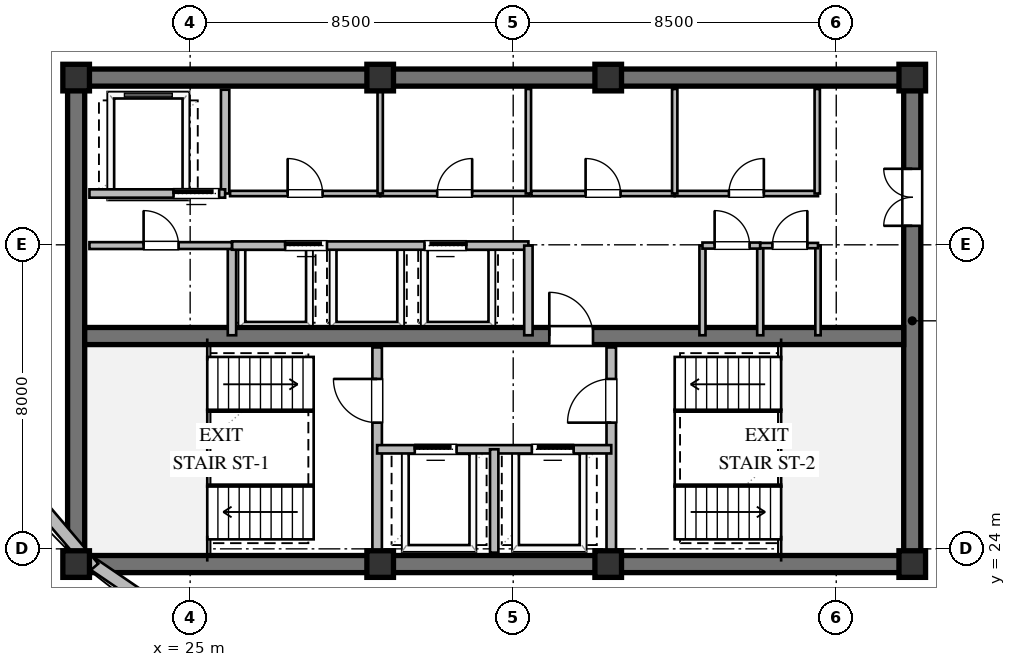
"""IFC4 building model, lengths in metres.
Left out: names, types, materials, properties, quantities, classifications, styles, units other than length and angle.
Written with IfcOpenShell. Run it as: python <this file> out.ifc"""

import sys

from ifc_helpers import new_model, si_unit, direction, frame, frame_2d, origin, origin_2d, place, context, subcontext, project, spatial, rectangle, extrude, element, fill, save


model = new_model("IFC4")
c1 = context("Model", 3, precision=1e-05, world=origin(), true_north=direction((0.0, 1.0)))
c2 = subcontext(c1, "Body", "Model", "MODEL_VIEW")
j1 = project(units=[si_unit("LENGTHUNIT", "METRE"), si_unit("PLANEANGLEUNIT", "RADIAN")], contexts=[c1])
p1 = place(None, origin())
s1 = spatial("IfcSite", under=j1, at=p1, CompositionType="ELEMENT")
p2 = place(p1, origin())
s2 = spatial("IfcBuilding", under=s1, at=p2, CompositionType="ELEMENT")
p3 = place(p2, frame((0.0, 0.0, 273.8)))
s3 = spatial("IfcBuildingStorey", under=s2, at=p3, CompositionType="ELEMENT", Elevation=273.8)
for number, where, z_axis, x_axis in (
    (1, (21.775, 23.6, 0.0), (0.0, 0.0, 1.0), (1.0, 0.0, 0.0)),
    (2, (21.775, 36.4, 0.0), (0.0, 0.0, 1.0), (1.0, 0.0, 0.0)),
):
    element("IfcWall", number, at=place(p3, frame(where, z_axis=z_axis, x_axis=x_axis)), inside=s3, PredefinedType="SHEAR", context=c2, shape_type="SweptSolid", body=[
        extrude(rectangle(XDim=22.45, YDim=0.45, at=frame_2d((11.225, 0.0))), origin(), (0.0, 0.0, 1.0), 3.56),
    ])
p4 = place(p3, frame((22.0, 23.825, 0.0), z_axis=(0.0, 0.0, 1.0), x_axis=(0.0, 1.0, 0.0)))
e3 = element("IfcWall", 3, at=p4, inside=s3, PredefinedType="SHEAR", context=c2, shape_type="SweptSolid", body=[
    extrude(rectangle(XDim=12.35, YDim=0.45, at=frame_2d((6.175, 0.0))), origin(), (0.0, 0.0, 1.0), 3.56),
])
p5 = place(p3, frame((44.0, 23.825, 0.0), z_axis=(0.0, 0.0, 1.0), x_axis=(0.0, 1.0, 0.0)))
e4 = element("IfcWall", 4, at=p5, inside=s3, PredefinedType="SHEAR", context=c2, shape_type="SweptSolid", body=[
    extrude(rectangle(XDim=12.35, YDim=0.45, at=frame_2d((6.175, 0.0))), origin(), (0.0, 0.0, 1.0), 3.56),
])
p6 = place(p5, frame((8.675, 0.0, 0.0)))
e5 = element("IfcOpeningElement", 5, at=p6, cuts=e4, PredefinedType="OPENING", context=c2, shape_type="SweptSolid", body=[
    extrude(rectangle(XDim=1.5, YDim=2.15, at=frame_2d((0.75, 1.075))), frame((0.0, 0.235, 0.0), z_axis=(0.0, -1.0, 0.0), x_axis=(1.0, 0.0, 0.0)), (0.0, 0.0, 1.0), 0.47),
])
p7 = place(p3, frame((22.225, 29.6, 0.0), z_axis=(0.0, 0.0, 1.0), x_axis=(1.0, 0.0, 0.0)))
e6 = element("IfcWall", 6, at=p7, inside=s3, PredefinedType="SHEAR", context=c2, shape_type="SweptSolid", body=[
    extrude(rectangle(XDim=21.55, YDim=0.45, at=frame_2d((10.775, 0.0))), origin(), (0.0, 0.0, 1.0), 3.56),
])
p8 = place(p7, frame((12.225, 0.0, 0.0)))
e7 = element("IfcOpeningElement", 7, at=p8, cuts=e6, PredefinedType="OPENING", context=c2, shape_type="SweptSolid", body=[
    extrude(rectangle(XDim=1.15, YDim=2.1, at=frame_2d((0.575, 1.05))), frame((0.0, 0.235, 0.0), z_axis=(0.0, -1.0, 0.0), x_axis=(1.0, 0.0, 0.0)), (0.0, 0.0, 1.0), 0.47),
])
for number, where, z_axis, x_axis in (
    (8, (22.0, 23.6, 0.0), (0.0, 0.0, 1.0), (1.0, 0.0, 0.0)),
    (9, (30.0, 23.6, 0.0), (0.0, 0.0, 1.0), (1.0, 0.0, 0.0)),
    (10, (36.0, 23.6, 0.0), (0.0, 0.0, 1.0), (1.0, 0.0, 0.0)),
    (11, (44.0, 23.6, 0.0), (0.0, 0.0, 1.0), (1.0, 0.0, 0.0)),
    (12, (44.0, 36.4, 0.0), (0.0, 0.0, 1.0), (1.0, 0.0, 0.0)),
    (13, (36.0, 36.4, 0.0), (0.0, 0.0, 1.0), (1.0, 0.0, 0.0)),
    (14, (30.0, 36.4, 0.0), (0.0, 0.0, 1.0), (1.0, 0.0, 0.0)),
    (15, (22.0, 36.4, 0.0), (0.0, 0.0, 1.0), (1.0, 0.0, 0.0)),
):
    element("IfcColumn", number, at=place(p3, frame(where, z_axis=z_axis, x_axis=x_axis)), inside=s3, PredefinedType="COLUMN", context=c2, shape_type="SweptSolid", body=[
        extrude(rectangle(XDim=0.7, YDim=0.7, at=origin_2d()), origin(), (0.0, 0.0, 1.0), 3.8),
    ])
p9 = place(p3, frame((27.093, 20.428, 0.0), z_axis=(0.0, 0.0, 1.0), x_axis=(-0.826047009588, 0.563601222454, 0.0)))
e16 = element("IfcWall", 16, at=p9, inside=s3, PredefinedType="STANDARD", context=c2, shape_type="SweptSolid", body=[
    extrude(rectangle(XDim=6.074, YDim=0.32, at=frame_2d((3.037, 0.0))), origin(), (0.0, 0.0, 1.0), 2.35),
])
p10 = place(p3, frame((22.46, 23.506, 0.0), z_axis=(0.0, 0.0, 1.0), x_axis=(-0.648393724369, 0.761305180725, 0.0)))
e17 = element("IfcWall", 17, at=p10, inside=s3, PredefinedType="STANDARD", context=c2, shape_type="SweptSolid", body=[
    extrude(rectangle(XDim=5.836, YDim=0.32, at=frame_2d((2.918, 0.0))), origin(), (0.0, 0.0, 1.0), 2.7),
])
p11 = place(p3, frame((29.92, 23.9, 0.0), z_axis=(0.0, 0.0, 1.0), x_axis=(0.0, 1.0, 0.0)))
e18 = element("IfcWall", 18, at=p11, inside=s3, PredefinedType="SOLIDWALL", context=c2, shape_type="SweptSolid", body=[
    extrude(rectangle(XDim=5.4, YDim=0.25, at=frame_2d((2.7, 0.0))), origin(), (0.0, 0.0, 1.0), 3.006),
])
p12 = place(p11, frame((3.421, 0.0, 0.0)))
e19 = element("IfcOpeningElement", 19, at=p12, cuts=e18, PredefinedType="OPENING", context=c2, shape_type="SweptSolid", body=[
    extrude(rectangle(XDim=1.15, YDim=2.1, at=frame_2d((0.575, 1.05))), frame((0.0, 0.135, 0.0), z_axis=(0.0, -1.0, 0.0), x_axis=(1.0, 0.0, 0.0)), (0.0, 0.0, 1.0), 0.27),
])
p13 = place(p3, frame((36.08, 23.9, 0.0), z_axis=(0.0, 0.0, 1.0), x_axis=(0.0, 1.0, 0.0)))
e20 = element("IfcWall", 20, at=p13, inside=s3, PredefinedType="SOLIDWALL", context=c2, shape_type="SweptSolid", body=[
    extrude(rectangle(XDim=5.4, YDim=0.25, at=frame_2d((2.7, 0.0))), origin(), (0.0, 0.0, 1.0), 3.56),
])
p14 = place(p13, frame((3.421, 0.0, 0.0)))
e21 = element("IfcOpeningElement", 21, at=p14, cuts=e20, PredefinedType="OPENING", context=c2, shape_type="SweptSolid", body=[
    extrude(rectangle(XDim=1.15, YDim=2.1, at=frame_2d((0.575, 1.05))), frame((0.0, 0.135, 0.0), z_axis=(0.0, -1.0, 0.0), x_axis=(1.0, 0.0, 0.0)), (0.0, 0.0, 1.0), 0.27),
])
p15 = place(p3, frame((29.92, 26.62, 0.0), z_axis=(0.0, 0.0, 1.0), x_axis=(1.0, 0.0, 0.0)))
e22 = element("IfcWall", 22, at=p15, inside=s3, PredefinedType="SOLIDWALL", context=c2, shape_type="SweptSolid", body=[
    extrude(rectangle(XDim=6.16, YDim=0.22, at=frame_2d((3.08, 0.0))), origin(), (0.0, 0.0, 1.0), 3.56),
])
p16 = place(p15, frame((0.99, 0.0, 0.0)))
e23 = element("IfcOpeningElement", 23, at=p16, cuts=e22, PredefinedType="OPENING", context=c2, shape_type="SweptSolid", body=[
    extrude(rectangle(XDim=1.1, YDim=2.1, at=frame_2d((0.55, 1.05))), frame((0.0, 0.12, 0.0), z_axis=(0.0, -1.0, 0.0), x_axis=(1.0, 0.0, 0.0)), (0.0, 0.0, 1.0), 0.24),
])
p17 = place(p15, frame((4.07, 0.0, 0.0)))
e24 = element("IfcOpeningElement", 24, at=p17, cuts=e22, PredefinedType="OPENING", context=c2, shape_type="SweptSolid", body=[
    extrude(rectangle(XDim=1.1, YDim=2.1, at=frame_2d((0.55, 1.05))), frame((0.0, 0.12, 0.0), z_axis=(0.0, -1.0, 0.0), x_axis=(1.0, 0.0, 0.0)), (0.0, 0.0, 1.0), 0.24),
])
p18 = place(p3, frame((33.0, 23.9, 0.0), z_axis=(0.0, 0.0, 1.0), x_axis=(0.0, 1.0, 0.0)))
e25 = element("IfcWall", 25, at=p18, inside=s3, PredefinedType="SOLIDWALL", context=c2, shape_type="SweptSolid", body=[
    extrude(rectangle(XDim=2.72, YDim=0.22, at=frame_2d((1.36, 0.0))), origin(), (0.0, 0.0, 1.0), 3.56),
])
p19 = place(p3, frame((25.92, 33.35, 0.0), z_axis=(0.0, 0.0, 1.0), x_axis=(0.0, 1.0, 0.0)))
e26 = element("IfcWall", 26, at=p19, inside=s3, PredefinedType="SOLIDWALL", context=c2, shape_type="SweptSolid", body=[
    extrude(rectangle(XDim=2.73, YDim=0.22, at=frame_2d((1.365, 0.0))), origin(), (0.0, 0.0, 1.0), 3.56),
])
p20 = place(p3, frame((22.35, 33.35, 0.0), z_axis=(0.0, 0.0, 1.0), x_axis=(1.0, 0.0, 0.0)))
e27 = element("IfcWall", 27, at=p20, inside=s3, PredefinedType="SOLIDWALL", context=c2, shape_type="SweptSolid", body=[
    extrude(rectangle(XDim=3.57, YDim=0.22, at=frame_2d((1.785, 0.0))), origin(), (0.0, 0.0, 1.0), 3.56),
])
p21 = place(p20, frame((2.213, 0.0, 0.0)))
e28 = element("IfcOpeningElement", 28, at=p21, cuts=e27, PredefinedType="OPENING", context=c2, shape_type="SweptSolid", body=[
    extrude(rectangle(XDim=1.2, YDim=2.1, at=frame_2d((0.6, 1.05))), frame((0.0, 0.12, 0.0), z_axis=(0.0, -1.0, 0.0), x_axis=(1.0, 0.0, 0.0)), (0.0, 0.0, 1.0), 0.24),
])
p22 = place(p3, frame((26.1, 29.62, 0.0), z_axis=(0.0, 0.0, 1.0), x_axis=(0.0, 1.0, 0.0)))
e29 = element("IfcWall", 29, at=p22, inside=s3, PredefinedType="SOLIDWALL", context=c2, shape_type="SweptSolid", body=[
    extrude(rectangle(XDim=2.36, YDim=0.22, at=frame_2d((1.18, 0.0))), origin(), (0.0, 0.0, 1.0), 3.56),
])
p23 = place(p3, frame((26.1, 31.98, 0.0), z_axis=(0.0, 0.0, 1.0), x_axis=(1.0, 0.0, 0.0)))
e30 = element("IfcWall", 30, at=p23, inside=s3, PredefinedType="SOLIDWALL", context=c2, shape_type="SweptSolid", body=[
    extrude(rectangle(XDim=7.8, YDim=0.22, at=frame_2d((3.9, 0.0))), origin(), (0.0, 0.0, 1.0), 3.56),
])
p24 = place(p23, frame((1.4, 0.0, 0.0)))
e31 = element("IfcOpeningElement", 31, at=p24, cuts=e30, PredefinedType="OPENING", context=c2, shape_type="SweptSolid", body=[
    extrude(rectangle(XDim=1.1, YDim=2.1, at=frame_2d((0.55, 1.05))), frame((0.0, 0.12, 0.0), z_axis=(0.0, -1.0, 0.0), x_axis=(1.0, 0.0, 0.0)), (0.0, 0.0, 1.0), 0.24),
])
p25 = place(p23, frame((5.066, 0.0, 0.0)))
e32 = element("IfcOpeningElement", 32, at=p25, cuts=e30, PredefinedType="OPENING", context=c2, shape_type="SweptSolid", body=[
    extrude(rectangle(XDim=1.1, YDim=2.1, at=frame_2d((0.55, 1.05))), frame((0.0, 0.12, 0.0), z_axis=(0.0, -1.0, 0.0), x_axis=(1.0, 0.0, 0.0)), (0.0, 0.0, 1.0), 0.24),
])
p26 = place(p3, frame((33.9, 29.62, 0.0), z_axis=(0.0, 0.0, 1.0), x_axis=(0.0, 1.0, 0.0)))
e33 = element("IfcWall", 33, at=p26, inside=s3, PredefinedType="SOLIDWALL", context=c2, shape_type="SweptSolid", body=[
    extrude(rectangle(XDim=2.36, YDim=0.22, at=frame_2d((1.18, 0.0))), origin(), (0.0, 0.0, 1.0), 3.56),
])
p27 = place(p3, frame((26.05, 33.35, 0.0), z_axis=(0.0, 0.0, 1.0), x_axis=(1.0, 0.0, 0.0)))
e34 = element("IfcWall", 34, at=p27, inside=s3, PredefinedType="PARTITIONING", context=c2, shape_type="SweptSolid", body=[
    extrude(rectangle(XDim=3.95, YDim=0.14, at=frame_2d((1.975, 0.0))), origin(), (0.0, 0.0, 1.0), 3.56),
])
p28 = place(p27, frame((1.515, 0.0, 0.0)))
e35 = element("IfcOpeningElement", 35, at=p28, cuts=e34, PredefinedType="OPENING", context=c2, shape_type="SweptSolid", body=[
    extrude(rectangle(XDim=0.92, YDim=2.1, at=frame_2d((0.46, 1.05))), frame((0.0, 0.08, 0.0), z_axis=(0.0, -1.0, 0.0), x_axis=(1.0, 0.0, 0.0)), (0.0, 0.0, 1.0), 0.16),
])
p29 = place(p3, frame((30.0, 33.35, 0.0), z_axis=(0.0, 0.0, 1.0), x_axis=(1.0, 0.0, 0.0)))
e36 = element("IfcWall", 36, at=p29, inside=s3, PredefinedType="PARTITIONING", context=c2, shape_type="SweptSolid", body=[
    extrude(rectangle(XDim=3.92, YDim=0.14, at=frame_2d((1.96, 0.0))), origin(), (0.0, 0.0, 1.0), 3.56),
])
p30 = place(p29, frame((1.5, 0.0, 0.0)))
e37 = element("IfcOpeningElement", 37, at=p30, cuts=e36, PredefinedType="OPENING", context=c2, shape_type="SweptSolid", body=[
    extrude(rectangle(XDim=0.92, YDim=2.1, at=frame_2d((0.46, 1.05))), frame((0.0, 0.08, 0.0), z_axis=(0.0, -1.0, 0.0), x_axis=(1.0, 0.0, 0.0)), (0.0, 0.0, 1.0), 0.16),
])
for number, where, z_axis, x_axis in (
    (38, (30.0, 33.35, 0.0), (0.0, 0.0, 1.0), (0.0, 1.0, 0.0)),
    (39, (33.9, 33.35, 0.0), (0.0, 0.0, 1.0), (0.0, 1.0, 0.0)),
):
    element("IfcWall", number, at=place(p3, frame(where, z_axis=z_axis, x_axis=x_axis)), inside=s3, PredefinedType="PARTITIONING", context=c2, shape_type="SweptSolid", body=[
        extrude(rectangle(XDim=2.75, YDim=0.14, at=frame_2d((1.375, 0.0))), origin(), (0.0, 0.0, 1.0), 3.56),
    ])
p31 = place(p3, frame((33.98, 33.35, 0.0), z_axis=(0.0, 0.0, 1.0), x_axis=(1.0, 0.0, 0.0)))
e40 = element("IfcWall", 40, at=p31, inside=s3, PredefinedType="PARTITIONING", context=c2, shape_type="SweptSolid", body=[
    extrude(rectangle(XDim=3.77, YDim=0.14, at=frame_2d((1.885, 0.0))), origin(), (0.0, 0.0, 1.0), 3.56),
])
p32 = place(p31, frame((1.425, 0.0, 0.0)))
e41 = element("IfcOpeningElement", 41, at=p32, cuts=e40, PredefinedType="OPENING", context=c2, shape_type="SweptSolid", body=[
    extrude(rectangle(XDim=0.92, YDim=2.1, at=frame_2d((0.46, 1.05))), frame((0.0, 0.08, 0.0), z_axis=(0.0, -1.0, 0.0), x_axis=(1.0, 0.0, 0.0)), (0.0, 0.0, 1.0), 0.16),
])
p33 = place(p3, frame((37.75, 33.35, 0.0), z_axis=(0.0, 0.0, 1.0), x_axis=(1.0, 0.0, 0.0)))
e42 = element("IfcWall", 42, at=p33, inside=s3, PredefinedType="PARTITIONING", context=c2, shape_type="SweptSolid", body=[
    extrude(rectangle(XDim=3.77, YDim=0.14, at=frame_2d((1.885, 0.0))), origin(), (0.0, 0.0, 1.0), 3.56),
])
p34 = place(p33, frame((1.425, 0.0, 0.0)))
e43 = element("IfcOpeningElement", 43, at=p34, cuts=e42, PredefinedType="OPENING", context=c2, shape_type="SweptSolid", body=[
    extrude(rectangle(XDim=0.92, YDim=2.1, at=frame_2d((0.46, 1.05))), frame((0.0, 0.08, 0.0), z_axis=(0.0, -1.0, 0.0), x_axis=(1.0, 0.0, 0.0)), (0.0, 0.0, 1.0), 0.16),
])
for number, where, z_axis, x_axis in (
    (44, (37.75, 33.35, 0.0), (0.0, 0.0, 1.0), (0.0, 1.0, 0.0)),
    (45, (41.5, 33.35, 0.0), (0.0, 0.0, 1.0), (0.0, 1.0, 0.0)),
):
    element("IfcWall", number, at=place(p3, frame(where, z_axis=z_axis, x_axis=x_axis)), inside=s3, PredefinedType="PARTITIONING", context=c2, shape_type="SweptSolid", body=[
        extrude(rectangle(XDim=2.75, YDim=0.14, at=frame_2d((1.375, 0.0))), origin(), (0.0, 0.0, 1.0), 3.56),
    ])
p35 = place(p3, frame((22.35, 31.98, 0.0), z_axis=(0.0, 0.0, 1.0), x_axis=(1.0, 0.0, 0.0)))
e46 = element("IfcWall", 46, at=p35, inside=s3, PredefinedType="PARTITIONING", context=c2, shape_type="SweptSolid", body=[
    extrude(rectangle(XDim=3.75, YDim=0.18, at=frame_2d((1.875, 0.0))), origin(), (0.0, 0.0, 1.0), 3.56),
])
p36 = place(p35, frame((1.425, 0.0, 0.0)))
e47 = element("IfcOpeningElement", 47, at=p36, cuts=e46, PredefinedType="OPENING", context=c2, shape_type="SweptSolid", body=[
    extrude(rectangle(XDim=0.92, YDim=2.1, at=frame_2d((0.46, 1.05))), frame((0.0, 0.1, 0.0), z_axis=(0.0, -1.0, 0.0), x_axis=(1.0, 0.0, 0.0)), (0.0, 0.0, 1.0), 0.2),
])
for number, where, z_axis, x_axis in (
    (48, (38.48, 29.62, 0.0), (0.0, 0.0, 1.0), (0.0, 1.0, 0.0)),
    (49, (40.0, 29.62, 0.0), (0.0, 0.0, 1.0), (0.0, 1.0, 0.0)),
):
    element("IfcWall", number, at=place(p3, frame(where, z_axis=z_axis, x_axis=x_axis)), inside=s3, PredefinedType="PLUMBINGWALL", context=c2, shape_type="SweptSolid", body=[
        extrude(rectangle(XDim=2.36, YDim=0.16, at=frame_2d((1.18, 0.0))), origin(), (0.0, 0.0, 1.0), 3.56),
    ])
p37 = place(p3, frame((41.52, 29.62, 0.0), z_axis=(0.0, 0.0, 1.0), x_axis=(0.0, 1.0, 0.0)))
e50 = element("IfcWall", 50, at=p37, inside=s3, PredefinedType="PARTITIONING", context=c2, shape_type="SweptSolid", body=[
    extrude(rectangle(XDim=2.36, YDim=0.14, at=frame_2d((1.18, 0.0))), origin(), (0.0, 0.0, 1.0), 3.56),
])
p38 = place(p3, frame((38.48, 31.98, 0.0), z_axis=(0.0, 0.0, 1.0), x_axis=(1.0, 0.0, 0.0)))
e51 = element("IfcWall", 51, at=p38, inside=s3, PredefinedType="PLUMBINGWALL", context=c2, shape_type="SweptSolid", body=[
    extrude(rectangle(XDim=1.52, YDim=0.16, at=frame_2d((0.76, 0.0))), origin(), (0.0, 0.0, 1.0), 3.56),
])
p39 = place(p38, frame((0.32, 0.0, 0.0)))
e52 = element("IfcOpeningElement", 52, at=p39, cuts=e51, PredefinedType="OPENING", context=c2, shape_type="SweptSolid", body=[
    extrude(rectangle(XDim=0.92, YDim=2.1, at=frame_2d((0.46, 1.05))), frame((0.0, 0.09, 0.0), z_axis=(0.0, -1.0, 0.0), x_axis=(1.0, 0.0, 0.0)), (0.0, 0.0, 1.0), 0.18),
])
p40 = place(p3, frame((40.0, 31.98, 0.0), z_axis=(0.0, 0.0, 1.0), x_axis=(1.0, 0.0, 0.0)))
e53 = element("IfcWall", 53, at=p40, inside=s3, PredefinedType="PARTITIONING", context=c2, shape_type="SweptSolid", body=[
    extrude(rectangle(XDim=1.52, YDim=0.14, at=frame_2d((0.76, 0.0))), origin(), (0.0, 0.0, 1.0), 3.56),
])
p41 = place(p40, frame((0.32, 0.0, 0.0)))
e54 = element("IfcOpeningElement", 54, at=p41, cuts=e53, PredefinedType="OPENING", context=c2, shape_type="SweptSolid", body=[
    extrude(rectangle(XDim=0.92, YDim=2.1, at=frame_2d((0.46, 1.05))), frame((0.0, 0.08, 0.0), z_axis=(0.0, -1.0, 0.0), x_axis=(1.0, 0.0, 0.0)), (0.0, 0.0, 1.0), 0.16),
])
p42 = place(p12, origin())
e55 = element("IfcDoor", 55, at=p42, inside=s3, OperationType="SINGLE_SWING_RIGHT", PredefinedType="DOOR", context=c2, shape_type="SweptSolid", body=[
    extrude(rectangle(XDim=1.15, YDim=2.1, at=frame_2d((0.575, 1.05))), frame((0.0, 0.025, 0.0), z_axis=(0.0, -1.0, 0.0), x_axis=(1.0, 0.0, 0.0)), (0.0, 0.0, 1.0), 0.05),
])
fill(e19, e55)
p43 = place(p14, origin())
e56 = element("IfcDoor", 56, at=p43, inside=s3, OperationType="SINGLE_SWING_LEFT", PredefinedType="DOOR", context=c2, shape_type="SweptSolid", body=[
    extrude(rectangle(XDim=1.15, YDim=2.1, at=frame_2d((0.575, 1.05))), frame((0.0, 0.025, 0.0), z_axis=(0.0, -1.0, 0.0), x_axis=(1.0, 0.0, 0.0)), (0.0, 0.0, 1.0), 0.05),
])
fill(e21, e56)
p44 = place(p16, origin())
e57 = element("IfcDoor", 57, at=p44, inside=s3, OperationType="SLIDING_TO_LEFT", PredefinedType="DOOR", context=c2, shape_type="SweptSolid", body=[
    extrude(rectangle(XDim=1.1, YDim=2.1, at=frame_2d((0.55, 1.05))), frame((0.0, 0.025, 0.0), z_axis=(0.0, -1.0, 0.0), x_axis=(1.0, 0.0, 0.0)), (0.0, 0.0, 1.0), 0.05),
])
fill(e23, e57)
p45 = place(p17, origin())
e58 = element("IfcDoor", 58, at=p45, inside=s3, OperationType="SLIDING_TO_RIGHT", PredefinedType="DOOR", context=c2, shape_type="SweptSolid", body=[
    extrude(rectangle(XDim=1.1, YDim=2.1, at=frame_2d((0.55, 1.05))), frame((0.0, 0.025, 0.0), z_axis=(0.0, -1.0, 0.0), x_axis=(1.0, 0.0, 0.0)), (0.0, 0.0, 1.0), 0.05),
])
fill(e24, e58)
p46 = place(p8, origin())
e59 = element("IfcDoor", 59, at=p46, inside=s3, OperationType="SINGLE_SWING_LEFT", PredefinedType="DOOR", context=c2, shape_type="SweptSolid", body=[
    extrude(rectangle(XDim=1.15, YDim=2.1, at=frame_2d((0.575, 1.05))), frame((0.0, 0.025, 0.0), z_axis=(0.0, -1.0, 0.0), x_axis=(1.0, 0.0, 0.0)), (0.0, 0.0, 1.0), 0.05),
])
fill(e7, e59)
p47 = place(p6, origin())
e60 = element("IfcDoor", 60, at=p47, inside=s3, OperationType="DOUBLE_DOOR_SINGLE_SWING", PredefinedType="DOOR", context=c2, shape_type="SweptSolid", body=[
    extrude(rectangle(XDim=1.5, YDim=2.15, at=frame_2d((0.75, 1.075))), frame((0.0, 0.025, 0.0), z_axis=(0.0, -1.0, 0.0), x_axis=(1.0, 0.0, 0.0)), (0.0, 0.0, 1.0), 0.05),
])
fill(e5, e60)
p48 = place(p21, origin())
e61 = element("IfcDoor", 61, at=p48, inside=s3, OperationType="SLIDING_TO_LEFT", PredefinedType="DOOR", context=c2, shape_type="SweptSolid", body=[
    extrude(rectangle(XDim=1.2, YDim=2.1, at=frame_2d((0.6, 1.05))), frame((0.0, 0.025, 0.0), z_axis=(0.0, -1.0, 0.0), x_axis=(1.0, 0.0, 0.0)), (0.0, 0.0, 1.0), 0.05),
])
fill(e28, e61)
p49 = place(p24, origin())
e62 = element("IfcDoor", 62, at=p49, inside=s3, OperationType="SLIDING_TO_LEFT", PredefinedType="DOOR", context=c2, shape_type="SweptSolid", body=[
    extrude(rectangle(XDim=1.1, YDim=2.1, at=frame_2d((0.55, 1.05))), frame((0.0, 0.025, 0.0), z_axis=(0.0, -1.0, 0.0), x_axis=(1.0, 0.0, 0.0)), (0.0, 0.0, 1.0), 0.05),
])
fill(e31, e62)
p50 = place(p25, origin())
e63 = element("IfcDoor", 63, at=p50, inside=s3, OperationType="SLIDING_TO_RIGHT", PredefinedType="DOOR", context=c2, shape_type="SweptSolid", body=[
    extrude(rectangle(XDim=1.1, YDim=2.1, at=frame_2d((0.55, 1.05))), frame((0.0, 0.025, 0.0), z_axis=(0.0, -1.0, 0.0), x_axis=(1.0, 0.0, 0.0)), (0.0, 0.0, 1.0), 0.05),
])
fill(e32, e63)
p51 = place(p28, origin())
e64 = element("IfcDoor", 64, at=p51, inside=s3, OperationType="SINGLE_SWING_LEFT", PredefinedType="DOOR", context=c2, shape_type="SweptSolid", body=[
    extrude(rectangle(XDim=0.92, YDim=2.1, at=frame_2d((0.46, 1.05))), frame((0.0, 0.025, 0.0), z_axis=(0.0, -1.0, 0.0), x_axis=(1.0, 0.0, 0.0)), (0.0, 0.0, 1.0), 0.05),
])
fill(e35, e64)
p52 = place(p30, origin())
e65 = element("IfcDoor", 65, at=p52, inside=s3, OperationType="SINGLE_SWING_RIGHT", PredefinedType="DOOR", context=c2, shape_type="SweptSolid", body=[
    extrude(rectangle(XDim=0.92, YDim=2.1, at=frame_2d((0.46, 1.05))), frame((0.0, 0.025, 0.0), z_axis=(0.0, -1.0, 0.0), x_axis=(1.0, 0.0, 0.0)), (0.0, 0.0, 1.0), 0.05),
])
fill(e37, e65)
p53 = place(p32, origin())
e66 = element("IfcDoor", 66, at=p53, inside=s3, OperationType="SINGLE_SWING_LEFT", PredefinedType="DOOR", context=c2, shape_type="SweptSolid", body=[
    extrude(rectangle(XDim=0.92, YDim=2.1, at=frame_2d((0.46, 1.05))), frame((0.0, 0.025, 0.0), z_axis=(0.0, -1.0, 0.0), x_axis=(1.0, 0.0, 0.0)), (0.0, 0.0, 1.0), 0.05),
])
fill(e41, e66)
p54 = place(p34, origin())
e67 = element("IfcDoor", 67, at=p54, inside=s3, OperationType="SINGLE_SWING_RIGHT", PredefinedType="DOOR", context=c2, shape_type="SweptSolid", body=[
    extrude(rectangle(XDim=0.92, YDim=2.1, at=frame_2d((0.46, 1.05))), frame((0.0, 0.025, 0.0), z_axis=(0.0, -1.0, 0.0), x_axis=(1.0, 0.0, 0.0)), (0.0, 0.0, 1.0), 0.05),
])
fill(e43, e67)
p55 = place(p36, origin())
e68 = element("IfcDoor", 68, at=p55, inside=s3, OperationType="SINGLE_SWING_LEFT", PredefinedType="DOOR", context=c2, shape_type="SweptSolid", body=[
    extrude(rectangle(XDim=0.92, YDim=2.1, at=frame_2d((0.46, 1.05))), frame((0.0, 0.025, 0.0), z_axis=(0.0, -1.0, 0.0), x_axis=(1.0, 0.0, 0.0)), (0.0, 0.0, 1.0), 0.05),
])
fill(e47, e68)
p56 = place(p39, origin())
e69 = element("IfcDoor", 69, at=p56, inside=s3, OperationType="SINGLE_SWING_LEFT", PredefinedType="DOOR", context=c2, shape_type="SweptSolid", body=[
    extrude(rectangle(XDim=0.92, YDim=2.1, at=frame_2d((0.46, 1.05))), frame((0.0, 0.025, 0.0), z_axis=(0.0, -1.0, 0.0), x_axis=(1.0, 0.0, 0.0)), (0.0, 0.0, 1.0), 0.05),
])
fill(e52, e69)
p57 = place(p41, origin())
e70 = element("IfcDoor", 70, at=p57, inside=s3, OperationType="SINGLE_SWING_RIGHT", PredefinedType="DOOR", context=c2, shape_type="SweptSolid", body=[
    extrude(rectangle(XDim=0.92, YDim=2.1, at=frame_2d((0.46, 1.05))), frame((0.0, 0.025, 0.0), z_axis=(0.0, -1.0, 0.0), x_axis=(1.0, 0.0, 0.0)), (0.0, 0.0, 1.0), 0.05),
])
fill(e54, e70)
save(model, sys.argv[1])
